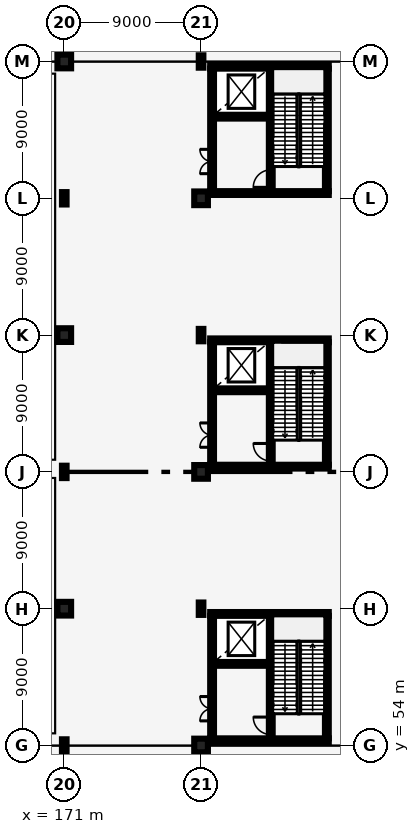
"""IFC4 building model, lengths in metres.
Left out: names, types, materials, properties, quantities, classifications, styles, units other than length and angle.
Written with IfcOpenShell. Run it as: python <this file> out.ifc"""

import sys

from ifc_helpers import new_model, si_unit, direction, frame, frame_2d, origin, origin_2d, place, context, subcontext, project, spatial, rectangle, i_section, extrude, element, fill, save


model = new_model("IFC4")
c1 = context("Model", 3, precision=1e-05, world=origin(), true_north=direction((0.0, 1.0)))
c2 = subcontext(c1, "Body", "Model", "MODEL_VIEW")
j1 = project(units=[si_unit("LENGTHUNIT", "METRE"), si_unit("PLANEANGLEUNIT", "RADIAN")], contexts=[c1])
p1 = place(None, origin())
s1 = spatial("IfcSite", under=j1, at=p1, CompositionType="ELEMENT")
p2 = place(p1, origin())
s2 = spatial("IfcBuilding", under=s1, at=p2, CompositionType="ELEMENT")
p3 = place(p2, origin())
s3 = spatial("IfcBuildingStorey", under=s2, at=p3, CompositionType="ELEMENT", Elevation=0.0)
p4 = place(p3, frame((171.0, 54.0, 0.0), z_axis=(0.0, 0.0, 1.0), x_axis=(1.0, 0.0, 0.0)))
e1 = element("IfcColumn", 1, at=p4, inside=s3, PredefinedType="COLUMN", context=c2, shape_type="SweptSolid", body=[
    extrude(i_section(OverallWidth=0.303, OverallDepth=0.814, WebThickness=0.021, FlangeThickness=0.04, FilletRadius=0.03, at=origin_2d()), origin(), (0.0, 0.0, 1.0), 6.0),
])
p5 = place(p3, frame((171.0, 63.0, 0.0), z_axis=(0.0, 0.0, 1.0), x_axis=(1.0, 0.0, 0.0)))
e2 = element("IfcColumn", 2, at=p5, inside=s3, PredefinedType="COLUMN", context=c2, shape_type="SweptSolid", body=[
    extrude(rectangle(XDim=0.9, YDim=0.9, at=origin_2d()), origin(), (0.0, 0.0, 1.0), 6.0),
])
p6 = place(p3, frame((171.0, 72.0, 0.0), z_axis=(0.0, 0.0, 1.0), x_axis=(1.0, 0.0, 0.0)))
e3 = element("IfcColumn", 3, at=p6, inside=s3, PredefinedType="COLUMN", context=c2, shape_type="SweptSolid", body=[
    extrude(i_section(OverallWidth=0.303, OverallDepth=0.814, WebThickness=0.021, FlangeThickness=0.04, FilletRadius=0.03, at=origin_2d()), origin(), (0.0, 0.0, 1.0), 6.0),
])
p7 = place(p3, frame((171.0, 81.0, 0.0), z_axis=(0.0, 0.0, 1.0), x_axis=(1.0, 0.0, 0.0)))
e4 = element("IfcColumn", 4, at=p7, inside=s3, PredefinedType="COLUMN", context=c2, shape_type="SweptSolid", body=[
    extrude(rectangle(XDim=0.9, YDim=0.9, at=origin_2d()), origin(), (0.0, 0.0, 1.0), 6.0),
])
p8 = place(p3, frame((171.0, 90.0, 0.0), z_axis=(0.0, 0.0, 1.0), x_axis=(1.0, 0.0, 0.0)))
e5 = element("IfcColumn", 5, at=p8, inside=s3, PredefinedType="COLUMN", context=c2, shape_type="SweptSolid", body=[
    extrude(i_section(OverallWidth=0.303, OverallDepth=0.814, WebThickness=0.021, FlangeThickness=0.04, FilletRadius=0.03, at=origin_2d()), origin(), (0.0, 0.0, 1.0), 6.0),
])
for number, where, z_axis, x_axis in (
    (6, (171.0, 99.0, 0.0), (0.0, 0.0, 1.0), (1.0, 0.0, 0.0)),
    (7, (180.0, 54.0, 0.0), (0.0, 0.0, 1.0), (1.0, 0.0, 0.0)),
):
    element("IfcColumn", number, at=place(p3, frame(where, z_axis=z_axis, x_axis=x_axis)), inside=s3, PredefinedType="COLUMN", context=c2, shape_type="SweptSolid", body=[
        extrude(rectangle(XDim=0.9, YDim=0.9, at=origin_2d()), origin(), (0.0, 0.0, 1.0), 6.0),
    ])
p9 = place(p3, frame((180.0, 63.0, 0.0), z_axis=(0.0, 0.0, 1.0), x_axis=(1.0, 0.0, 0.0)))
e8 = element("IfcColumn", 8, at=p9, inside=s3, PredefinedType="COLUMN", context=c2, shape_type="SweptSolid", body=[
    extrude(i_section(OverallWidth=0.303, OverallDepth=0.814, WebThickness=0.021, FlangeThickness=0.04, FilletRadius=0.03, at=origin_2d()), origin(), (0.0, 0.0, 1.0), 6.0),
])
p10 = place(p3, frame((180.0, 72.0, 0.0), z_axis=(0.0, 0.0, 1.0), x_axis=(1.0, 0.0, 0.0)))
e9 = element("IfcColumn", 9, at=p10, inside=s3, PredefinedType="COLUMN", context=c2, shape_type="SweptSolid", body=[
    extrude(rectangle(XDim=0.9, YDim=0.9, at=origin_2d()), origin(), (0.0, 0.0, 1.0), 6.0),
])
p11 = place(p3, frame((180.0, 81.0, 0.0), z_axis=(0.0, 0.0, 1.0), x_axis=(1.0, 0.0, 0.0)))
e10 = element("IfcColumn", 10, at=p11, inside=s3, PredefinedType="COLUMN", context=c2, shape_type="SweptSolid", body=[
    extrude(i_section(OverallWidth=0.303, OverallDepth=0.814, WebThickness=0.021, FlangeThickness=0.04, FilletRadius=0.03, at=origin_2d()), origin(), (0.0, 0.0, 1.0), 6.0),
])
p12 = place(p3, frame((180.0, 90.0, 0.0), z_axis=(0.0, 0.0, 1.0), x_axis=(1.0, 0.0, 0.0)))
e11 = element("IfcColumn", 11, at=p12, inside=s3, PredefinedType="COLUMN", context=c2, shape_type="SweptSolid", body=[
    extrude(rectangle(XDim=0.9, YDim=0.9, at=origin_2d()), origin(), (0.0, 0.0, 1.0), 6.0),
])
p13 = place(p3, frame((180.0, 99.0, 0.0), z_axis=(0.0, 0.0, 1.0), x_axis=(1.0, 0.0, 0.0)))
e12 = element("IfcColumn", 12, at=p13, inside=s3, PredefinedType="COLUMN", context=c2, shape_type="SweptSolid", body=[
    extrude(i_section(OverallWidth=0.303, OverallDepth=0.814, WebThickness=0.021, FlangeThickness=0.04, FilletRadius=0.03, at=origin_2d()), origin(), (0.0, 0.0, 1.0), 6.0),
])
p14 = place(p3, frame((180.725, 54.47, 0.0), z_axis=(0.0, 0.0, 1.0), x_axis=(0.0, 1.0, 0.0)))
e13 = element("IfcWall", 13, at=p14, inside=s3, PredefinedType="SHEAR", context=c2, shape_type="SweptSolid", body=[
    extrude(rectangle(XDim=8.06, YDim=0.25, at=frame_2d((4.03, 0.0))), origin(), (0.0, 0.0, 1.0), 5.64),
])
p15 = place(p14, frame((1.15, 0.0, 0.0)))
e14 = element("IfcOpeningElement", 14, at=p15, cuts=e13, PredefinedType="OPENING", context=c2, shape_type="SweptSolid", body=[
    extrude(rectangle(XDim=1.6, YDim=2.2, at=frame_2d((0.8, 1.1))), frame((0.0, 0.135, 0.0), z_axis=(0.0, -1.0, 0.0), x_axis=(1.0, 0.0, 0.0)), (0.0, 0.0, 1.0), 0.27),
])
p16 = place(p3, frame((188.275, 54.47, 0.0), z_axis=(0.0, 0.0, 1.0), x_axis=(0.0, 1.0, 0.0)))
e15 = element("IfcWall", 15, at=p16, inside=s3, PredefinedType="SHEAR", context=c2, shape_type="SweptSolid", body=[
    extrude(rectangle(XDim=8.06, YDim=0.25, at=frame_2d((4.03, 0.0))), origin(), (0.0, 0.0, 1.0), 5.64),
])
for number, where, z_axis, x_axis in (
    (16, (180.6, 54.345, 0.0), (0.0, 0.0, 1.0), (1.0, 0.0, 0.0)),
    (17, (180.6, 62.655, 0.0), (0.0, 0.0, 1.0), (1.0, 0.0, 0.0)),
):
    element("IfcWall", number, at=place(p3, frame(where, z_axis=z_axis, x_axis=x_axis)), inside=s3, PredefinedType="SHEAR", context=c2, shape_type="SweptSolid", body=[
        extrude(rectangle(XDim=7.8, YDim=0.25, at=frame_2d((3.9, 0.0))), origin(), (0.0, 0.0, 1.0), 5.64),
    ])
p17 = place(p3, frame((184.585, 54.47, 0.0), z_axis=(0.0, 0.0, 1.0), x_axis=(0.0, 1.0, 0.0)))
e18 = element("IfcWall", 18, at=p17, inside=s3, PredefinedType="SHEAR", context=c2, shape_type="SweptSolid", body=[
    extrude(rectangle(XDim=8.06, YDim=0.25, at=frame_2d((4.03, 0.0))), origin(), (0.0, 0.0, 1.0), 5.64),
])
p18 = place(p17, frame((0.25, 0.0, 0.0)))
e19 = element("IfcOpeningElement", 19, at=p18, cuts=e18, PredefinedType="OPENING", context=c2, shape_type="SweptSolid", body=[
    extrude(rectangle(XDim=1.15, YDim=2.15, at=frame_2d((0.575, 1.075))), frame((0.0, 0.135, 0.0), z_axis=(0.0, -1.0, 0.0), x_axis=(1.0, 0.0, 0.0)), (0.0, 0.0, 1.0), 0.27),
])
p19 = place(p3, frame((180.85, 59.37, 0.0), z_axis=(0.0, 0.0, 1.0), x_axis=(1.0, 0.0, 0.0)))
e20 = element("IfcWall", 20, at=p19, inside=s3, PredefinedType="SHEAR", context=c2, shape_type="SweptSolid", body=[
    extrude(rectangle(XDim=3.61, YDim=0.25, at=frame_2d((1.805, 0.0))), origin(), (0.0, 0.0, 1.0), 5.64),
])
p20 = place(p19, frame((0.95, 0.0, 0.0)))
e21 = element("IfcOpeningElement", 21, at=p20, cuts=e20, PredefinedType="OPENING", context=c2, shape_type="SweptSolid", body=[
    extrude(rectangle(XDim=1.2, YDim=2.2, at=frame_2d((0.6, 1.1))), frame((0.0, 0.135, 0.0), z_axis=(0.0, -1.0, 0.0), x_axis=(1.0, 0.0, 0.0)), (0.0, 0.0, 1.0), 0.27),
])
p21 = place(p3, frame((180.725, 72.47, 0.0), z_axis=(0.0, 0.0, 1.0), x_axis=(0.0, 1.0, 0.0)))
e22 = element("IfcWall", 22, at=p21, inside=s3, PredefinedType="SHEAR", context=c2, shape_type="SweptSolid", body=[
    extrude(rectangle(XDim=8.06, YDim=0.25, at=frame_2d((4.03, 0.0))), origin(), (0.0, 0.0, 1.0), 5.64),
])
p22 = place(p21, frame((1.15, 0.0, 0.0)))
e23 = element("IfcOpeningElement", 23, at=p22, cuts=e22, PredefinedType="OPENING", context=c2, shape_type="SweptSolid", body=[
    extrude(rectangle(XDim=1.6, YDim=2.2, at=frame_2d((0.8, 1.1))), frame((0.0, 0.135, 0.0), z_axis=(0.0, -1.0, 0.0), x_axis=(1.0, 0.0, 0.0)), (0.0, 0.0, 1.0), 0.27),
])
p23 = place(p3, frame((188.275, 72.47, 0.0), z_axis=(0.0, 0.0, 1.0), x_axis=(0.0, 1.0, 0.0)))
e24 = element("IfcWall", 24, at=p23, inside=s3, PredefinedType="SHEAR", context=c2, shape_type="SweptSolid", body=[
    extrude(rectangle(XDim=8.06, YDim=0.25, at=frame_2d((4.03, 0.0))), origin(), (0.0, 0.0, 1.0), 5.64),
])
for number, where, z_axis, x_axis in (
    (25, (180.6, 72.345, 0.0), (0.0, 0.0, 1.0), (1.0, 0.0, 0.0)),
    (26, (180.6, 80.655, 0.0), (0.0, 0.0, 1.0), (1.0, 0.0, 0.0)),
):
    element("IfcWall", number, at=place(p3, frame(where, z_axis=z_axis, x_axis=x_axis)), inside=s3, PredefinedType="SHEAR", context=c2, shape_type="SweptSolid", body=[
        extrude(rectangle(XDim=7.8, YDim=0.25, at=frame_2d((3.9, 0.0))), origin(), (0.0, 0.0, 1.0), 5.64),
    ])
p24 = place(p3, frame((184.585, 72.47, 0.0), z_axis=(0.0, 0.0, 1.0), x_axis=(0.0, 1.0, 0.0)))
e27 = element("IfcWall", 27, at=p24, inside=s3, PredefinedType="SHEAR", context=c2, shape_type="SweptSolid", body=[
    extrude(rectangle(XDim=8.06, YDim=0.25, at=frame_2d((4.03, 0.0))), origin(), (0.0, 0.0, 1.0), 5.64),
])
p25 = place(p24, frame((0.25, 0.0, 0.0)))
e28 = element("IfcOpeningElement", 28, at=p25, cuts=e27, PredefinedType="OPENING", context=c2, shape_type="SweptSolid", body=[
    extrude(rectangle(XDim=1.15, YDim=2.15, at=frame_2d((0.575, 1.075))), frame((0.0, 0.135, 0.0), z_axis=(0.0, -1.0, 0.0), x_axis=(1.0, 0.0, 0.0)), (0.0, 0.0, 1.0), 0.27),
])
p26 = place(p3, frame((180.85, 77.37, 0.0), z_axis=(0.0, 0.0, 1.0), x_axis=(1.0, 0.0, 0.0)))
e29 = element("IfcWall", 29, at=p26, inside=s3, PredefinedType="SHEAR", context=c2, shape_type="SweptSolid", body=[
    extrude(rectangle(XDim=3.61, YDim=0.25, at=frame_2d((1.805, 0.0))), origin(), (0.0, 0.0, 1.0), 5.64),
])
p27 = place(p26, frame((0.95, 0.0, 0.0)))
e30 = element("IfcOpeningElement", 30, at=p27, cuts=e29, PredefinedType="OPENING", context=c2, shape_type="SweptSolid", body=[
    extrude(rectangle(XDim=1.2, YDim=2.2, at=frame_2d((0.6, 1.1))), frame((0.0, 0.135, 0.0), z_axis=(0.0, -1.0, 0.0), x_axis=(1.0, 0.0, 0.0)), (0.0, 0.0, 1.0), 0.27),
])
p28 = place(p3, frame((180.725, 90.47, 0.0), z_axis=(0.0, 0.0, 1.0), x_axis=(0.0, 1.0, 0.0)))
e31 = element("IfcWall", 31, at=p28, inside=s3, PredefinedType="SHEAR", context=c2, shape_type="SweptSolid", body=[
    extrude(rectangle(XDim=8.06, YDim=0.25, at=frame_2d((4.03, 0.0))), origin(), (0.0, 0.0, 1.0), 5.64),
])
p29 = place(p28, frame((1.15, 0.0, 0.0)))
e32 = element("IfcOpeningElement", 32, at=p29, cuts=e31, PredefinedType="OPENING", context=c2, shape_type="SweptSolid", body=[
    extrude(rectangle(XDim=1.6, YDim=2.2, at=frame_2d((0.8, 1.1))), frame((0.0, 0.135, 0.0), z_axis=(0.0, -1.0, 0.0), x_axis=(1.0, 0.0, 0.0)), (0.0, 0.0, 1.0), 0.27),
])
p30 = place(p3, frame((188.275, 90.47, 0.0), z_axis=(0.0, 0.0, 1.0), x_axis=(0.0, 1.0, 0.0)))
e33 = element("IfcWall", 33, at=p30, inside=s3, PredefinedType="SHEAR", context=c2, shape_type="SweptSolid", body=[
    extrude(rectangle(XDim=8.06, YDim=0.25, at=frame_2d((4.03, 0.0))), origin(), (0.0, 0.0, 1.0), 5.64),
])
for number, where, z_axis, x_axis in (
    (34, (180.6, 90.345, 0.0), (0.0, 0.0, 1.0), (1.0, 0.0, 0.0)),
    (35, (180.6, 98.655, 0.0), (0.0, 0.0, 1.0), (1.0, 0.0, 0.0)),
):
    element("IfcWall", number, at=place(p3, frame(where, z_axis=z_axis, x_axis=x_axis)), inside=s3, PredefinedType="SHEAR", context=c2, shape_type="SweptSolid", body=[
        extrude(rectangle(XDim=7.8, YDim=0.25, at=frame_2d((3.9, 0.0))), origin(), (0.0, 0.0, 1.0), 5.64),
    ])
p31 = place(p3, frame((184.585, 90.47, 0.0), z_axis=(0.0, 0.0, 1.0), x_axis=(0.0, 1.0, 0.0)))
e36 = element("IfcWall", 36, at=p31, inside=s3, PredefinedType="SHEAR", context=c2, shape_type="SweptSolid", body=[
    extrude(rectangle(XDim=8.06, YDim=0.25, at=frame_2d((4.03, 0.0))), origin(), (0.0, 0.0, 1.0), 5.64),
])
p32 = place(p31, frame((0.25, 0.0, 0.0)))
e37 = element("IfcOpeningElement", 37, at=p32, cuts=e36, PredefinedType="OPENING", context=c2, shape_type="SweptSolid", body=[
    extrude(rectangle(XDim=1.15, YDim=2.15, at=frame_2d((0.575, 1.075))), frame((0.0, 0.135, 0.0), z_axis=(0.0, -1.0, 0.0), x_axis=(1.0, 0.0, 0.0)), (0.0, 0.0, 1.0), 0.27),
])
p33 = place(p3, frame((180.85, 95.37, 0.0), z_axis=(0.0, 0.0, 1.0), x_axis=(1.0, 0.0, 0.0)))
e38 = element("IfcWall", 38, at=p33, inside=s3, PredefinedType="SHEAR", context=c2, shape_type="SweptSolid", body=[
    extrude(rectangle(XDim=3.61, YDim=0.25, at=frame_2d((1.805, 0.0))), origin(), (0.0, 0.0, 1.0), 5.64),
])
p34 = place(p33, frame((0.95, 0.0, 0.0)))
e39 = element("IfcOpeningElement", 39, at=p34, cuts=e38, PredefinedType="OPENING", context=c2, shape_type="SweptSolid", body=[
    extrude(rectangle(XDim=1.2, YDim=2.2, at=frame_2d((0.6, 1.1))), frame((0.0, 0.135, 0.0), z_axis=(0.0, -1.0, 0.0), x_axis=(1.0, 0.0, 0.0)), (0.0, 0.0, 1.0), 0.27),
])
p35 = place(p18, origin())
e40 = element("IfcDoor", 40, at=p35, inside=s3, OperationType="SINGLE_SWING_RIGHT", PredefinedType="DOOR", context=c2, shape_type="SweptSolid", body=[
    extrude(rectangle(XDim=1.15, YDim=2.15, at=frame_2d((0.575, 1.075))), frame((0.0, 0.025, 0.0), z_axis=(0.0, -1.0, 0.0), x_axis=(1.0, 0.0, 0.0)), (0.0, 0.0, 1.0), 0.05),
])
fill(e19, e40)
p36 = place(p20, origin())
e41 = element("IfcDoor", 41, at=p36, inside=s3, OperationType="DOUBLE_DOOR_SLIDING", PredefinedType="DOOR", context=c2, shape_type="SweptSolid", body=[
    extrude(rectangle(XDim=1.2, YDim=2.2, at=frame_2d((0.6, 1.1))), frame((0.0, 0.025, 0.0), z_axis=(0.0, -1.0, 0.0), x_axis=(1.0, 0.0, 0.0)), (0.0, 0.0, 1.0), 0.05),
])
fill(e21, e41)
p37 = place(p15, origin())
e42 = element("IfcDoor", 42, at=p37, inside=s3, OperationType="DOUBLE_DOOR_SINGLE_SWING", PredefinedType="DOOR", context=c2, shape_type="SweptSolid", body=[
    extrude(rectangle(XDim=1.6, YDim=2.2, at=frame_2d((0.8, 1.1))), frame((0.0, 0.025, 0.0), z_axis=(0.0, -1.0, 0.0), x_axis=(1.0, 0.0, 0.0)), (0.0, 0.0, 1.0), 0.05),
])
fill(e14, e42)
p38 = place(p25, origin())
e43 = element("IfcDoor", 43, at=p38, inside=s3, OperationType="SINGLE_SWING_RIGHT", PredefinedType="DOOR", context=c2, shape_type="SweptSolid", body=[
    extrude(rectangle(XDim=1.15, YDim=2.15, at=frame_2d((0.575, 1.075))), frame((0.0, 0.025, 0.0), z_axis=(0.0, -1.0, 0.0), x_axis=(1.0, 0.0, 0.0)), (0.0, 0.0, 1.0), 0.05),
])
fill(e28, e43)
p39 = place(p27, origin())
e44 = element("IfcDoor", 44, at=p39, inside=s3, OperationType="DOUBLE_DOOR_SLIDING", PredefinedType="DOOR", context=c2, shape_type="SweptSolid", body=[
    extrude(rectangle(XDim=1.2, YDim=2.2, at=frame_2d((0.6, 1.1))), frame((0.0, 0.025, 0.0), z_axis=(0.0, -1.0, 0.0), x_axis=(1.0, 0.0, 0.0)), (0.0, 0.0, 1.0), 0.05),
])
fill(e30, e44)
p40 = place(p22, origin())
e45 = element("IfcDoor", 45, at=p40, inside=s3, OperationType="DOUBLE_DOOR_SINGLE_SWING", PredefinedType="DOOR", context=c2, shape_type="SweptSolid", body=[
    extrude(rectangle(XDim=1.6, YDim=2.2, at=frame_2d((0.8, 1.1))), frame((0.0, 0.025, 0.0), z_axis=(0.0, -1.0, 0.0), x_axis=(1.0, 0.0, 0.0)), (0.0, 0.0, 1.0), 0.05),
])
fill(e23, e45)
p41 = place(p32, origin())
e46 = element("IfcDoor", 46, at=p41, inside=s3, OperationType="SINGLE_SWING_LEFT", PredefinedType="DOOR", context=c2, shape_type="SweptSolid", body=[
    extrude(rectangle(XDim=1.15, YDim=2.15, at=frame_2d((0.575, 1.075))), frame((0.0, 0.025, 0.0), z_axis=(0.0, -1.0, 0.0), x_axis=(1.0, 0.0, 0.0)), (0.0, 0.0, 1.0), 0.05),
])
fill(e37, e46)
p42 = place(p34, origin())
e47 = element("IfcDoor", 47, at=p42, inside=s3, OperationType="DOUBLE_DOOR_SLIDING", PredefinedType="DOOR", context=c2, shape_type="SweptSolid", body=[
    extrude(rectangle(XDim=1.2, YDim=2.2, at=frame_2d((0.6, 1.1))), frame((0.0, 0.025, 0.0), z_axis=(0.0, -1.0, 0.0), x_axis=(1.0, 0.0, 0.0)), (0.0, 0.0, 1.0), 0.05),
])
fill(e39, e47)
p43 = place(p29, origin())
e48 = element("IfcDoor", 48, at=p43, inside=s3, OperationType="DOUBLE_DOOR_SINGLE_SWING", PredefinedType="DOOR", context=c2, shape_type="SweptSolid", body=[
    extrude(rectangle(XDim=1.6, YDim=2.2, at=frame_2d((0.8, 1.1))), frame((0.0, 0.025, 0.0), z_axis=(0.0, -1.0, 0.0), x_axis=(1.0, 0.0, 0.0)), (0.0, 0.0, 1.0), 0.05),
])
fill(e32, e48)
save(model, sys.argv[1])
